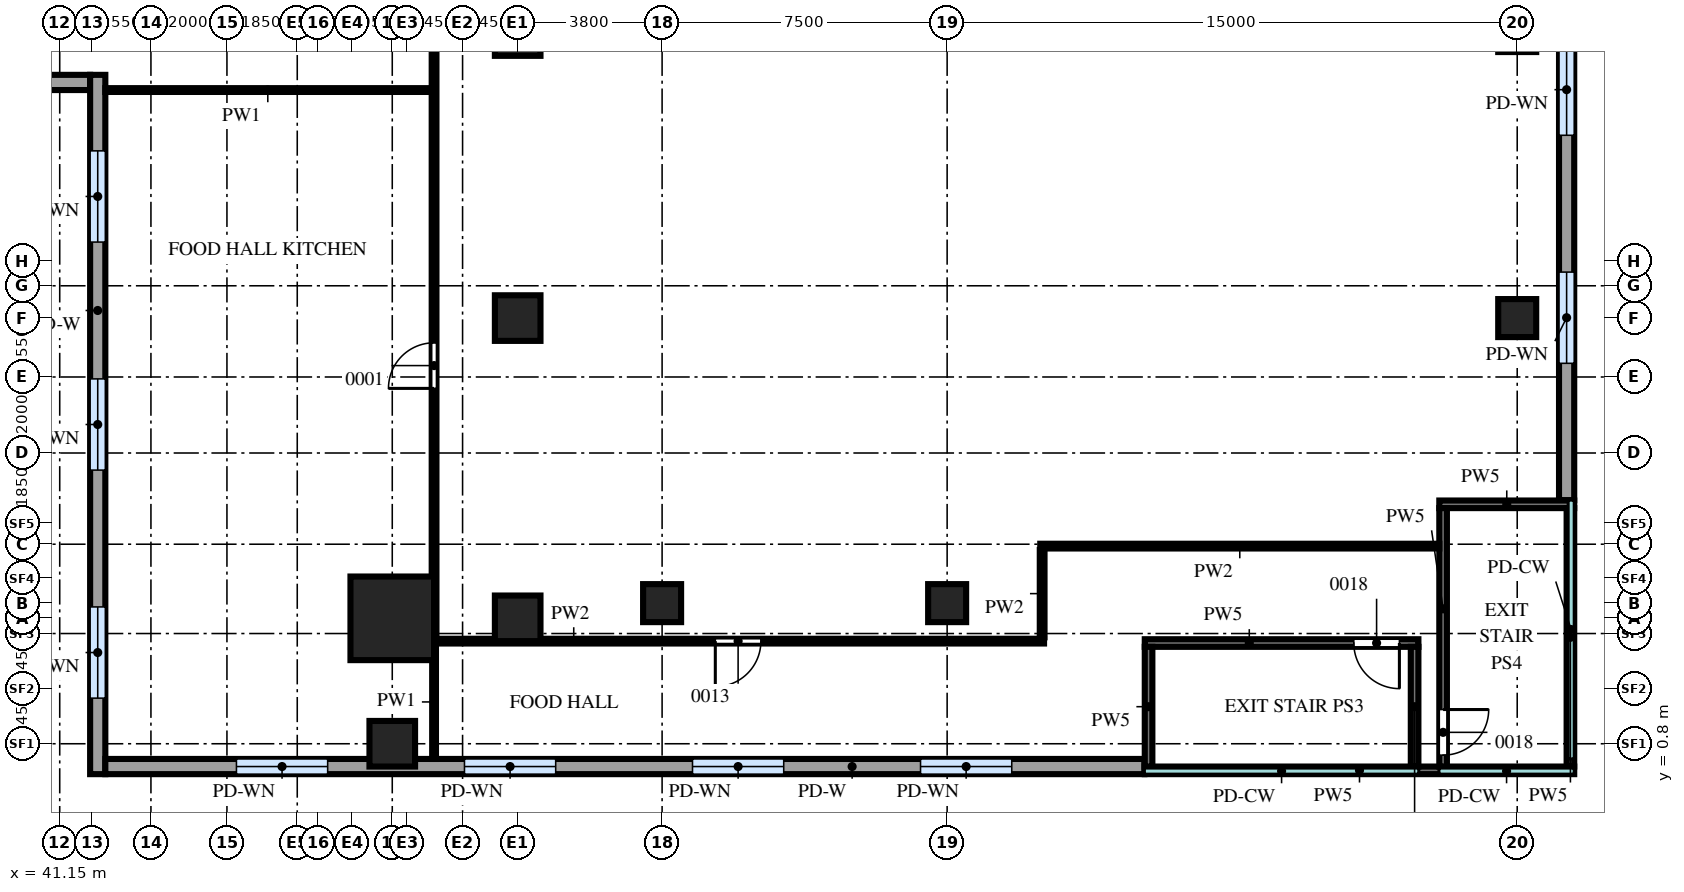
"""IFC4 building model, lengths in metres.
Left out: names, types, materials, properties, quantities, classifications, styles, units other than length and angle.
Written with IfcOpenShell. Run it as: python <this file> out.ifc"""

import sys

from ifc_helpers import new_model, si_unit, direction, frame, frame_2d, origin, origin_2d, place, context, subcontext, project, spatial, rectangle, extrude, source, transform, mapped, element, fill, save


model = new_model("IFC4")
c1 = context("Model", 3, precision=1e-05, world=origin(), true_north=direction((0.0, 1.0)))
c2 = subcontext(c1, "Body", "Model", "MODEL_VIEW")
j1 = project(units=[si_unit("LENGTHUNIT", "METRE"), si_unit("PLANEANGLEUNIT", "RADIAN")], contexts=[c1])
p1 = place(None, origin())
s1 = spatial("IfcSite", under=j1, at=p1, CompositionType="ELEMENT")
p2 = place(p1, origin())
s2 = spatial("IfcBuilding", under=s1, at=p2, CompositionType="ELEMENT")
p3 = place(p2, frame((0.0, 0.0, 13.0)))
s3 = spatial("IfcBuildingStorey", under=s2, at=p3, CompositionType="ELEMENT", Elevation=13.0)
m1 = source(origin(), c2, "Body", "SweptSolid", [
    extrude(rectangle(XDim=2.2, YDim=2.2, at=origin_2d()), origin(), (0.0, 0.0, 1.0), 5.2),
])
p4 = place(p3, frame((49.9, 4.1, 0.0), z_axis=(0.0, 0.0, 1.0), x_axis=(1.0, 0.0, 0.0)))
e1 = element("IfcColumn", 1, at=p4, inside=s3, PredefinedType="COLUMN", context=c2, shape_type="MappedRepresentation", body=[
    mapped(m1, transform((0.0, 0.0, 0.0))),
])
m2 = source(origin(), c2, "Body", "SweptSolid", [
    extrude(rectangle(XDim=1.2, YDim=1.2, at=origin_2d()), origin(), (0.0, 0.0, 1.0), 5.2),
])
for number, where, z_axis, x_axis in (
    (2, (49.9, 0.8, 0.0), (0.0, 0.0, 1.0), (1.0, 0.0, 0.0)),
    (3, (53.2, 4.1, 0.0), (0.0, 0.0, 1.0), (1.0, 0.0, 0.0)),
    (4, (53.2, 12.0, 0.0), (0.0, 0.0, 1.0), (1.0, 0.0, 0.0)),
    (5, (53.2, 19.5, 0.0), (0.0, 0.0, 1.0), (1.0, 0.0, 0.0)),
):
    element("IfcColumn", number, at=place(p3, frame(where, z_axis=z_axis, x_axis=x_axis)), inside=s3, PredefinedType="COLUMN", context=c2, shape_type="MappedRepresentation", body=[
        mapped(m2, transform((0.0, 0.0, 0.0))),
    ])
m3 = source(origin(), c2, "Body", "SweptSolid", [
    extrude(rectangle(XDim=1.0, YDim=1.0, at=origin_2d()), origin(), (0.0, 0.0, 1.0), 5.2),
])
for number, where, z_axis, x_axis in (
    (6, (57.0, 4.5, 0.0), (0.0, 0.0, 1.0), (1.0, 0.0, 0.0)),
    (7, (64.5, 4.5, 0.0), (0.0, 0.0, 1.0), (1.0, 0.0, 0.0)),
    (8, (79.5, 12.0, 0.0), (0.0, 0.0, 1.0), (1.0, 0.0, 0.0)),
):
    element("IfcColumn", number, at=place(p3, frame(where, z_axis=z_axis, x_axis=x_axis)), inside=s3, PredefinedType="COLUMN", context=c2, shape_type="MappedRepresentation", body=[
        mapped(m3, transform((0.0, 0.0, 0.0))),
    ])
m4 = source(origin(), c2, "Body", "SweptSolid", [
    extrude(rectangle(XDim=12.3, YDim=0.4, at=frame_2d((6.15, 0.0))), origin(), (0.0, 0.0, 1.0), 5.2),
])
p5 = place(p3, frame((29.65, 18.2, 0.0), z_axis=(0.0, 0.0, 1.0), x_axis=(1.0, 0.0, 0.0)))
e9 = element("IfcWall", 9, at=p5, inside=s3, PredefinedType="SOLIDWALL", context=c2, shape_type="MappedRepresentation", body=[
    mapped(m4, transform((0.0, 0.0, 0.0))),
])
m5 = source(origin(), c2, "Body", "SweptSolid", [
    extrude(rectangle(XDim=2.4, YDim=2.4, at=frame_2d((1.2, 1.2))), frame((0.0, 0.21, 0.0), z_axis=(0.0, -1.0, 0.0), x_axis=(1.0, 0.0, 0.0)), (0.0, 0.0, 1.0), 0.42),
])
p6 = place(p5, frame((1.95, 0.0, 1.0)))
e10 = element("IfcOpeningElement", 10, at=p6, cuts=e9, PredefinedType="OPENING", context=c2, shape_type="MappedRepresentation", body=[
    mapped(m5, transform((0.0, 0.0, 0.0))),
])
p7 = place(p5, frame((7.95, 0.0, 1.0)))
e11 = element("IfcOpeningElement", 11, at=p7, cuts=e9, PredefinedType="OPENING", context=c2, shape_type="MappedRepresentation", body=[
    mapped(m5, transform((0.0, 0.0, 0.0))),
])
m6 = source(origin(), c2, "Body", "SweptSolid", [
    extrude(rectangle(XDim=18.4, YDim=0.4, at=frame_2d((9.2, 0.0))), origin(), (0.0, 0.0, 1.0), 5.2),
])
p8 = place(p3, frame((42.15, 18.4, 0.0), z_axis=(0.0, 0.0, 1.0), x_axis=(0.0, -1.0, 0.0)))
e12 = element("IfcWall", 12, at=p8, inside=s3, PredefinedType="SOLIDWALL", context=c2, shape_type="MappedRepresentation", body=[
    mapped(m6, transform((0.0, 0.0, 0.0))),
])
p9 = place(p8, frame((2.0, 0.0, 1.0)))
e13 = element("IfcOpeningElement", 13, at=p9, cuts=e12, PredefinedType="OPENING", context=c2, shape_type="MappedRepresentation", body=[
    mapped(m5, transform((0.0, 0.0, 0.0))),
])
p10 = place(p8, frame((8.0, 0.0, 1.0)))
e14 = element("IfcOpeningElement", 14, at=p10, cuts=e12, PredefinedType="OPENING", context=c2, shape_type="MappedRepresentation", body=[
    mapped(m5, transform((0.0, 0.0, 0.0))),
])
p11 = place(p8, frame((14.0, 0.0, 1.0)))
e15 = element("IfcOpeningElement", 15, at=p11, cuts=e12, PredefinedType="OPENING", context=c2, shape_type="MappedRepresentation", body=[
    mapped(m5, transform((0.0, 0.0, 0.0))),
])
m7 = source(origin(), c2, "Body", "SweptSolid", [
    extrude(rectangle(XDim=27.34, YDim=0.4, at=frame_2d((13.67, 0.0))), origin(), (0.0, 0.0, 1.0), 5.2),
])
p12 = place(p3, frame((42.35, 0.2, 0.0), z_axis=(0.0, 0.0, 1.0), x_axis=(1.0, 0.0, 0.0)))
e16 = element("IfcWall", 16, at=p12, inside=s3, PredefinedType="SOLIDWALL", context=c2, shape_type="MappedRepresentation", body=[
    mapped(m7, transform((0.0, 0.0, 0.0))),
])
p13 = place(p12, frame((3.45, 0.0, 1.0)))
e17 = element("IfcOpeningElement", 17, at=p13, cuts=e16, PredefinedType="OPENING", context=c2, shape_type="MappedRepresentation", body=[
    mapped(m5, transform((0.0, 0.0, 0.0))),
])
p14 = place(p12, frame((9.45, 0.0, 1.0)))
e18 = element("IfcOpeningElement", 18, at=p14, cuts=e16, PredefinedType="OPENING", context=c2, shape_type="MappedRepresentation", body=[
    mapped(m5, transform((0.0, 0.0, 0.0))),
])
p15 = place(p12, frame((15.45, 0.0, 1.0)))
e19 = element("IfcOpeningElement", 19, at=p15, cuts=e16, PredefinedType="OPENING", context=c2, shape_type="MappedRepresentation", body=[
    mapped(m5, transform((0.0, 0.0, 0.0))),
])
p16 = place(p12, frame((21.45, 0.0, 1.0)))
e20 = element("IfcOpeningElement", 20, at=p16, cuts=e16, PredefinedType="OPENING", context=c2, shape_type="MappedRepresentation", body=[
    mapped(m5, transform((0.0, 0.0, 0.0))),
])
m8 = source(origin(), c2, "Body", "SweptSolid", [
    extrude(rectangle(XDim=39.58, YDim=0.4, at=frame_2d((19.79, 0.0))), origin(), (0.0, 0.0, 1.0), 5.2),
])
p17 = place(p3, frame((80.8, 7.21, 0.0), z_axis=(0.0, 0.0, 1.0), x_axis=(0.0, 1.0, 0.0)))
e21 = element("IfcWall", 21, at=p17, inside=s3, PredefinedType="SOLIDWALL", context=c2, shape_type="MappedRepresentation", body=[
    mapped(m8, transform((0.0, 0.0, 0.0))),
])
p18 = place(p17, frame((3.6, 0.0, 1.0)))
e22 = element("IfcOpeningElement", 22, at=p18, cuts=e21, PredefinedType="OPENING", context=c2, shape_type="MappedRepresentation", body=[
    mapped(m5, transform((0.0, 0.0, 0.0))),
])
p19 = place(p17, frame((9.6, 0.0, 1.0)))
e23 = element("IfcOpeningElement", 23, at=p19, cuts=e21, PredefinedType="OPENING", context=c2, shape_type="MappedRepresentation", body=[
    mapped(m5, transform((0.0, 0.0, 0.0))),
])
p20 = place(p17, frame((15.6, 0.0, 1.0)))
e24 = element("IfcOpeningElement", 24, at=p20, cuts=e21, PredefinedType="OPENING", context=c2, shape_type="MappedRepresentation", body=[
    mapped(m5, transform((0.0, 0.0, 0.0))),
])
p21 = place(p17, frame((21.6, 0.0, 1.0)))
e25 = element("IfcOpeningElement", 25, at=p21, cuts=e21, PredefinedType="OPENING", context=c2, shape_type="MappedRepresentation", body=[
    mapped(m5, transform((0.0, 0.0, 0.0))),
])
p22 = place(p17, frame((27.6, 0.0, 1.0)))
e26 = element("IfcOpeningElement", 26, at=p22, cuts=e21, PredefinedType="OPENING", context=c2, shape_type="MappedRepresentation", body=[
    mapped(m5, transform((0.0, 0.0, 0.0))),
])
p23 = place(p17, frame((33.6, 0.0, 1.0)))
e27 = element("IfcOpeningElement", 27, at=p23, cuts=e21, PredefinedType="OPENING", context=c2, shape_type="MappedRepresentation", body=[
    mapped(m5, transform((0.0, 0.0, 0.0))),
])
m9 = source(origin(), c2, "Body", "SweptSolid", [
    extrude(rectangle(XDim=11.3, YDim=0.2, at=frame_2d((5.65, 0.0))), origin(), (0.0, 0.0, 1.0), 5.2),
])
p24 = place(p3, frame((69.7, 0.1, 0.0), z_axis=(0.0, 0.0, 1.0), x_axis=(1.0, 0.0, 0.0)))
e28 = element("IfcWall", 28, at=p24, inside=s3, PredefinedType="PARTITIONING", context=c2, shape_type="MappedRepresentation", body=[
    mapped(m9, transform((0.0, 0.0, 0.0))),
])
m10 = source(origin(), c2, "Body", "SweptSolid", [
    extrude(rectangle(XDim=7.2, YDim=0.2, at=frame_2d((3.6, 0.0))), origin(), (0.0, 0.0, 1.0), 5.2),
])
p25 = place(p3, frame((69.7, 3.45, 0.0), z_axis=(0.0, 0.0, 1.0), x_axis=(1.0, 0.0, 0.0)))
e29 = element("IfcWall", 29, at=p25, inside=s3, PredefinedType="PARTITIONING", context=c2, shape_type="MappedRepresentation", body=[
    mapped(m10, transform((0.0, 0.0, 0.0))),
])
m11 = source(origin(), c2, "Body", "SweptSolid", [
    extrude(rectangle(XDim=1.2, YDim=2.1, at=frame_2d((0.6, 1.05))), frame((0.0, 0.11, 0.0), z_axis=(0.0, -1.0, 0.0), x_axis=(1.0, 0.0, 0.0)), (0.0, 0.0, 1.0), 0.22),
])
p26 = place(p25, frame((5.5, 0.0, 0.0)))
e30 = element("IfcOpeningElement", 30, at=p26, cuts=e29, PredefinedType="OPENING", context=c2, shape_type="MappedRepresentation", body=[
    mapped(m11, transform((0.0, 0.0, 0.0))),
])
m12 = source(origin(), c2, "Body", "SweptSolid", [
    extrude(rectangle(XDim=3.15, YDim=0.2, at=frame_2d((1.575, 0.0))), origin(), (0.0, 0.0, 1.0), 5.2),
])
for number, where, z_axis, x_axis in (
    (31, (69.8, 0.2, 0.0), (0.0, 0.0, 1.0), (0.0, 1.0, 0.0)),
    (32, (76.8, 0.2, 0.0), (0.0, 0.0, 1.0), (0.0, 1.0, 0.0)),
):
    element("IfcWall", number, at=place(p3, frame(where, z_axis=z_axis, x_axis=x_axis)), inside=s3, PredefinedType="PARTITIONING", context=c2, shape_type="MappedRepresentation", body=[
        mapped(m12, transform((0.0, 0.0, 0.0))),
    ])
m13 = source(origin(), c2, "Body", "SweptSolid", [
    extrude(rectangle(XDim=3.55, YDim=0.2, at=frame_2d((1.775, 0.0))), origin(), (0.0, 0.0, 1.0), 5.2),
])
p27 = place(p3, frame((77.45, 7.1, 0.0), z_axis=(0.0, 0.0, 1.0), x_axis=(1.0, 0.0, 0.0)))
e33 = element("IfcWall", 33, at=p27, inside=s3, PredefinedType="PARTITIONING", context=c2, shape_type="MappedRepresentation", body=[
    mapped(m13, transform((0.0, 0.0, 0.0))),
])
m14 = source(origin(), c2, "Body", "SweptSolid", [
    extrude(rectangle(XDim=6.8, YDim=0.2, at=frame_2d((3.4, 0.0))), origin(), (0.0, 0.0, 1.0), 5.2),
])
p28 = place(p3, frame((77.55, 0.2, 0.0), z_axis=(0.0, 0.0, 1.0), x_axis=(0.0, 1.0, 0.0)))
e34 = element("IfcWall", 34, at=p28, inside=s3, PredefinedType="PARTITIONING", context=c2, shape_type="MappedRepresentation", body=[
    mapped(m14, transform((0.0, 0.0, 0.0))),
])
p29 = place(p28, frame((0.3, 0.0, 0.0)))
e35 = element("IfcOpeningElement", 35, at=p29, cuts=e34, PredefinedType="OPENING", context=c2, shape_type="MappedRepresentation", body=[
    mapped(m11, transform((0.0, 0.0, 0.0))),
])
p30 = place(p3, frame((80.9, 0.2, 0.0), z_axis=(0.0, 0.0, 1.0), x_axis=(0.0, 1.0, 0.0)))
e36 = element("IfcWall", 36, at=p30, inside=s3, PredefinedType="PARTITIONING", context=c2, shape_type="MappedRepresentation", body=[
    mapped(m14, transform((0.0, 0.0, 0.0))),
])
m15 = source(origin(), c2, "Body", "SweptSolid", [
    extrude(rectangle(XDim=3.0, YDim=0.1, at=frame_2d((1.5, 0.0))), origin(), (0.0, 0.0, 1.0), 5.2),
])
p31 = place(p3, frame((51.0, 0.4, 0.0), z_axis=(0.0, 0.0, 1.0), x_axis=(0.0, 1.0, 0.0)))
e37 = element("IfcWall", 37, at=p31, inside=s3, PredefinedType="PARTITIONING", context=c2, shape_type="MappedRepresentation", body=[
    mapped(m15, transform((0.0, 0.0, 0.0))),
])
m16 = source(origin(), c2, "Body", "SweptSolid", [
    extrude(rectangle(XDim=16.1, YDim=0.125, at=frame_2d((8.05, 0.0))), origin(), (0.0, 0.0, 1.0), 5.2),
])
p32 = place(p3, frame((50.95, 3.5, 0.0), z_axis=(0.0, 0.0, 1.0), x_axis=(1.0, 0.0, 0.0)))
e38 = element("IfcWall", 38, at=p32, inside=s3, PredefinedType="PARTITIONING", context=c2, shape_type="MappedRepresentation", body=[
    mapped(m16, transform((0.0, 0.0, 0.0))),
])
m17 = source(origin(), c2, "Body", "SweptSolid", [
    extrude(rectangle(XDim=1.2, YDim=2.1, at=frame_2d((0.6, 1.05))), frame((0.0, 0.073, 0.0), z_axis=(0.0, -1.0, 0.0), x_axis=(1.0, 0.0, 0.0)), (0.0, 0.0, 1.0), 0.145),
])
p33 = place(p32, frame((7.45, 0.0, 0.0)))
e39 = element("IfcOpeningElement", 39, at=p33, cuts=e38, PredefinedType="OPENING", context=c2, shape_type="MappedRepresentation", body=[
    mapped(m17, transform((0.0, 0.0, 0.0))),
])
m18 = source(origin(), c2, "Body", "SweptSolid", [
    extrude(rectangle(XDim=29.7, YDim=0.125, at=frame_2d((14.85, 0.0))), origin(), (0.0, 0.0, 1.0), 5.2),
])
p34 = place(p3, frame((51.0, 3.6, 0.0), z_axis=(0.0, 0.0, 1.0), x_axis=(0.0, 1.0, 0.0)))
e40 = element("IfcWall", 40, at=p34, inside=s3, PredefinedType="PARTITIONING", context=c2, shape_type="MappedRepresentation", body=[
    mapped(m18, transform((0.0, 0.0, 0.0))),
])
p35 = place(p34, frame((6.55, 0.0, 0.0)))
e41 = element("IfcOpeningElement", 41, at=p35, cuts=e40, PredefinedType="OPENING", context=c2, shape_type="MappedRepresentation", body=[
    mapped(m17, transform((0.0, 0.0, 0.0))),
])
m19 = source(origin(), c2, "Body", "SweptSolid", [
    extrude(rectangle(XDim=2.3, YDim=0.125, at=frame_2d((1.15, 0.0))), origin(), (0.0, 0.0, 1.0), 5.2),
])
p36 = place(p3, frame((67.0, 3.6, 0.0), z_axis=(0.0, 0.0, 1.0), x_axis=(0.0, 1.0, 0.0)))
e42 = element("IfcWall", 42, at=p36, inside=s3, PredefinedType="PARTITIONING", context=c2, shape_type="MappedRepresentation", body=[
    mapped(m19, transform((0.0, 0.0, 0.0))),
])
m20 = source(origin(), c2, "Body", "SweptSolid", [
    extrude(rectangle(XDim=10.5, YDim=0.125, at=frame_2d((5.25, 0.0))), origin(), (0.0, 0.0, 1.0), 5.2),
])
p37 = place(p3, frame((66.95, 6.0, 0.0), z_axis=(0.0, 0.0, 1.0), x_axis=(1.0, 0.0, 0.0)))
e43 = element("IfcWall", 43, at=p37, inside=s3, PredefinedType="PARTITIONING", context=c2, shape_type="MappedRepresentation", body=[
    mapped(m20, transform((0.0, 0.0, 0.0))),
])
m21 = source(origin(), c2, "Body", "SweptSolid", [
    extrude(rectangle(XDim=8.55, YDim=0.1, at=frame_2d((4.275, 0.0))), origin(), (0.0, 0.0, 1.0), 5.2),
])
p38 = place(p3, frame((42.35, 18.0, 0.0), z_axis=(0.0, 0.0, 1.0), x_axis=(1.0, 0.0, 0.0)))
e44 = element("IfcWall", 44, at=p38, inside=s3, PredefinedType="PARTITIONING", context=c2, shape_type="MappedRepresentation", body=[
    mapped(m21, transform((0.0, 0.0, 0.0))),
])
m22 = source(origin(), c2, "Body", "SweptSolid", [
    extrude(rectangle(XDim=2.4, YDim=2.4, at=frame_2d((1.2, 1.2))), frame((0.0, 0.03, 0.0), z_axis=(0.0, -1.0, 0.0), x_axis=(1.0, 0.0, 0.0)), (0.0, 0.0, 1.0), 0.06),
])
p39 = place(p9, origin())
e45 = element("IfcWindow", 45, at=p39, inside=s3, PartitioningType="SINGLE_PANEL", PredefinedType="WINDOW", context=c2, shape_type="MappedRepresentation", body=[
    mapped(m22, transform((0.0, 0.0, 0.0))),
])
fill(e13, e45)
p40 = place(p10, origin())
e46 = element("IfcWindow", 46, at=p40, inside=s3, PartitioningType="SINGLE_PANEL", PredefinedType="WINDOW", context=c2, shape_type="MappedRepresentation", body=[
    mapped(m22, transform((0.0, 0.0, 0.0))),
])
fill(e14, e46)
p41 = place(p11, origin())
e47 = element("IfcWindow", 47, at=p41, inside=s3, PartitioningType="SINGLE_PANEL", PredefinedType="WINDOW", context=c2, shape_type="MappedRepresentation", body=[
    mapped(m22, transform((0.0, 0.0, 0.0))),
])
fill(e15, e47)
p42 = place(p13, origin())
e48 = element("IfcWindow", 48, at=p42, inside=s3, PartitioningType="SINGLE_PANEL", PredefinedType="WINDOW", context=c2, shape_type="MappedRepresentation", body=[
    mapped(m22, transform((0.0, 0.0, 0.0))),
])
fill(e17, e48)
p43 = place(p14, origin())
e49 = element("IfcWindow", 49, at=p43, inside=s3, PartitioningType="SINGLE_PANEL", PredefinedType="WINDOW", context=c2, shape_type="MappedRepresentation", body=[
    mapped(m22, transform((0.0, 0.0, 0.0))),
])
fill(e18, e49)
p44 = place(p15, origin())
e50 = element("IfcWindow", 50, at=p44, inside=s3, PartitioningType="SINGLE_PANEL", PredefinedType="WINDOW", context=c2, shape_type="MappedRepresentation", body=[
    mapped(m22, transform((0.0, 0.0, 0.0))),
])
fill(e19, e50)
p45 = place(p16, origin())
e51 = element("IfcWindow", 51, at=p45, inside=s3, PartitioningType="SINGLE_PANEL", PredefinedType="WINDOW", context=c2, shape_type="MappedRepresentation", body=[
    mapped(m22, transform((0.0, 0.0, 0.0))),
])
fill(e20, e51)
p46 = place(p18, origin())
e52 = element("IfcWindow", 52, at=p46, inside=s3, PartitioningType="SINGLE_PANEL", PredefinedType="WINDOW", context=c2, shape_type="MappedRepresentation", body=[
    mapped(m22, transform((0.0, 0.0, 0.0))),
])
fill(e22, e52)
p47 = place(p19, origin())
e53 = element("IfcWindow", 53, at=p47, inside=s3, PartitioningType="SINGLE_PANEL", PredefinedType="WINDOW", context=c2, shape_type="MappedRepresentation", body=[
    mapped(m22, transform((0.0, 0.0, 0.0))),
])
fill(e23, e53)
m23 = source(origin(), c2, "Body", "SweptSolid", [
    extrude(rectangle(XDim=1.2, YDim=2.1, at=frame_2d((0.6, 1.05))), frame((0.0, 0.025, 0.0), z_axis=(0.0, -1.0, 0.0), x_axis=(1.0, 0.0, 0.0)), (0.0, 0.0, 1.0), 0.05),
])
p48 = place(p35, origin())
e54 = element("IfcDoor", 54, at=p48, inside=s3, OperationType="SINGLE_SWING_RIGHT", PredefinedType="DOOR", context=c2, shape_type="MappedRepresentation", body=[
    mapped(m23, transform((0.0, 0.0, 0.0))),
])
fill(e41, e54)
p49 = place(p33, origin())
e55 = element("IfcDoor", 55, at=p49, inside=s3, OperationType="SINGLE_SWING_LEFT", PredefinedType="DOOR", context=c2, shape_type="MappedRepresentation", body=[
    mapped(m23, transform((0.0, 0.0, 0.0))),
])
fill(e39, e55)
p50 = place(p26, origin())
e56 = element("IfcDoor", 56, at=p50, inside=s3, OperationType="SINGLE_SWING_RIGHT", PredefinedType="DOOR", context=c2, shape_type="MappedRepresentation", body=[
    mapped(m23, transform((0.0, 0.0, 0.0))),
])
fill(e30, e56)
p51 = place(p29, origin())
e57 = element("IfcDoor", 57, at=p51, inside=s3, OperationType="SINGLE_SWING_RIGHT", PredefinedType="DOOR", context=c2, shape_type="MappedRepresentation", body=[
    mapped(m23, transform((0.0, 0.0, 0.0))),
])
fill(e35, e57)
save(model, sys.argv[1])
